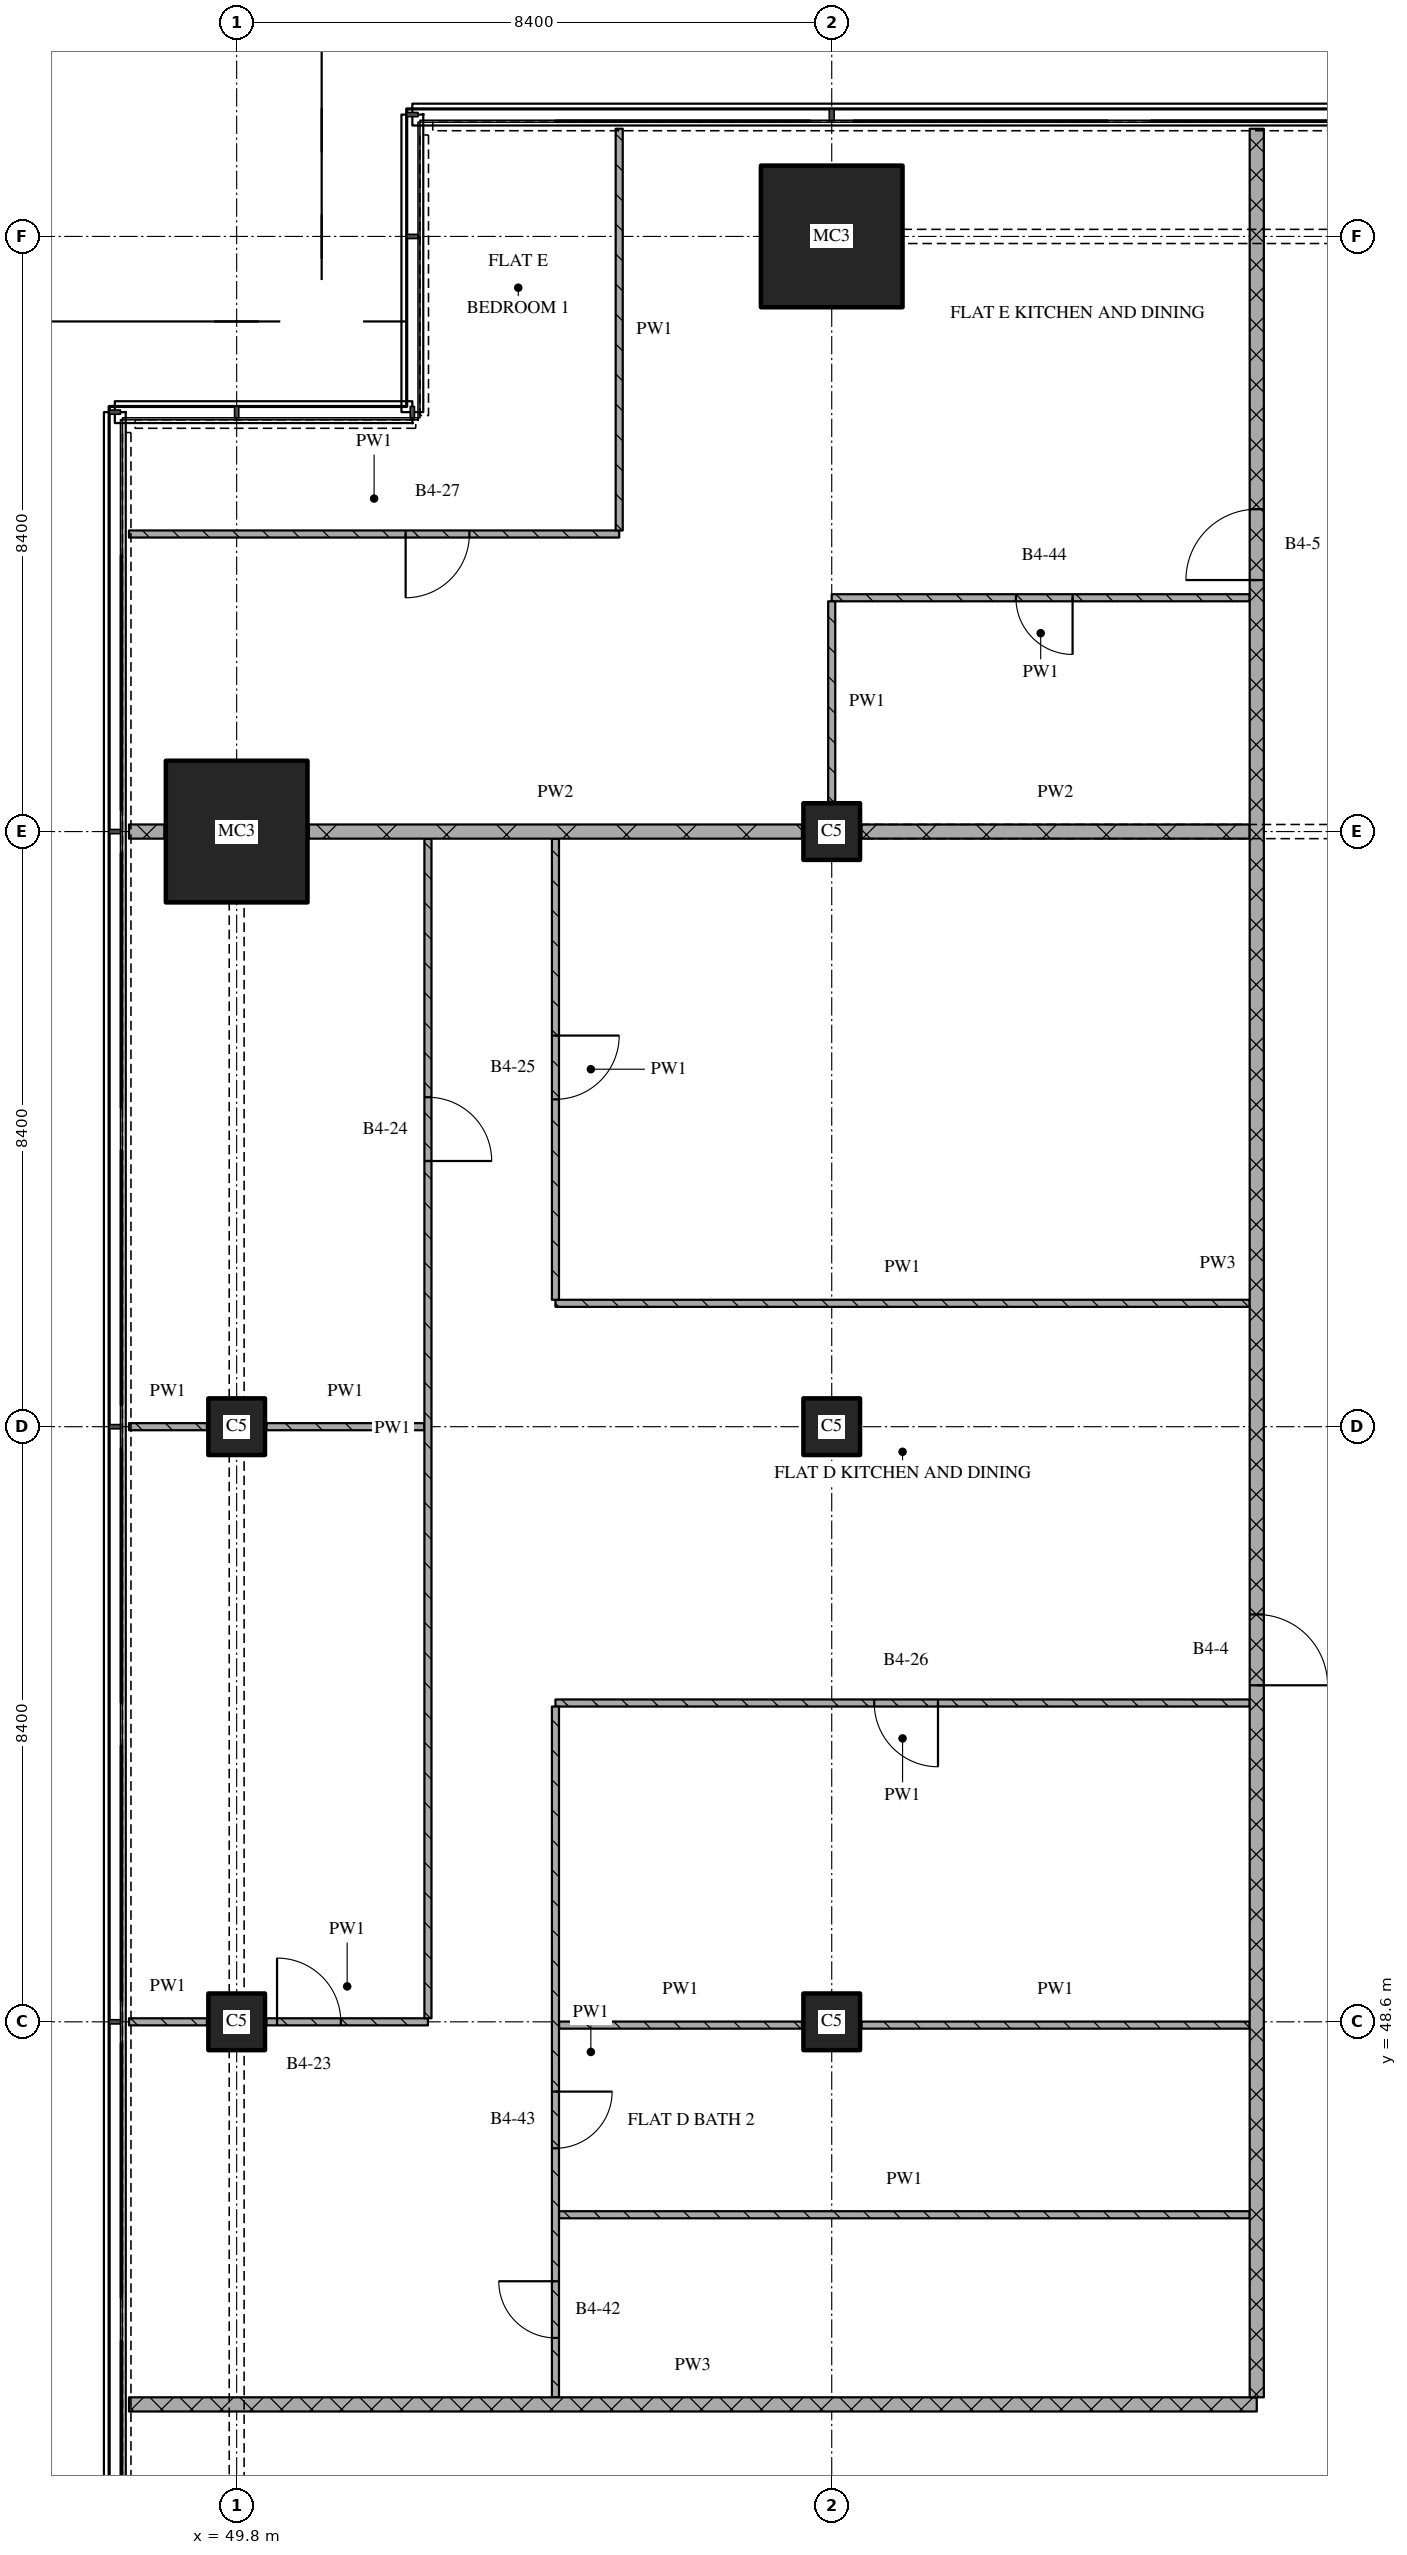
"""IFC4 building model, lengths in metres.
Left out: names, types, materials, properties, quantities, classifications, styles, units other than length and angle.
Written with IfcOpenShell. Run it as: python <this file> out.ifc"""

import sys

from ifc_helpers import new_model, si_unit, direction, frame, frame_2d, origin, origin_2d, place, context, subcontext, project, spatial, rectangle, extrude, element, fill, save


model = new_model("IFC4")
c1 = context("Model", 3, precision=1e-05, world=origin(), true_north=direction((0.0, 1.0)))
c2 = subcontext(c1, "Body", "Model", "MODEL_VIEW")
j1 = project(units=[si_unit("LENGTHUNIT", "METRE"), si_unit("PLANEANGLEUNIT", "RADIAN")], contexts=[c1])
p1 = place(None, origin())
s1 = spatial("IfcSite", under=j1, at=p1, CompositionType="ELEMENT")
p2 = place(p1, origin())
s2 = spatial("IfcBuilding", under=s1, at=p2, CompositionType="ELEMENT")
p3 = place(p2, frame((0.0, 0.0, 127.65)))
s3 = spatial("IfcBuildingStorey", under=s2, at=p3, CompositionType="ELEMENT", Elevation=127.65)
for number, where, z_axis, x_axis in (
    (1, (49.8, 48.6, 0.0), (0.0, 0.0, 1.0), (1.0, 0.0, 0.0)),
    (2, (49.8, 57.0, 0.0), (0.0, 0.0, 1.0), (1.0, 0.0, 0.0)),
):
    element("IfcColumn", number, at=place(p3, frame(where, z_axis=z_axis, x_axis=x_axis)), inside=s3, PredefinedType="COLUMN", context=c2, shape_type="SweptSolid", body=[
        extrude(rectangle(XDim=0.8, YDim=0.8, at=origin_2d()), origin(), (0.0, 0.0, 1.0), 3.6),
    ])
p4 = place(p3, frame((49.8, 65.4, 0.0), z_axis=(0.0, 0.0, 1.0), x_axis=(1.0, 0.0, 0.0)))
e3 = element("IfcColumn", 3, at=p4, inside=s3, PredefinedType="COLUMN", context=c2, shape_type="SweptSolid", body=[
    extrude(rectangle(XDim=2.0, YDim=2.0, at=origin_2d()), origin(), (0.0, 0.0, 1.0), 3.6),
])
for number, where, z_axis, x_axis in (
    (4, (58.2, 48.6, 0.0), (0.0, 0.0, 1.0), (1.0, 0.0, 0.0)),
    (5, (58.2, 57.0, 0.0), (0.0, 0.0, 1.0), (1.0, 0.0, 0.0)),
    (6, (58.2, 65.4, 0.0), (0.0, 0.0, 1.0), (1.0, 0.0, 0.0)),
):
    element("IfcColumn", number, at=place(p3, frame(where, z_axis=z_axis, x_axis=x_axis)), inside=s3, PredefinedType="COLUMN", context=c2, shape_type="SweptSolid", body=[
        extrude(rectangle(XDim=0.8, YDim=0.8, at=origin_2d()), origin(), (0.0, 0.0, 1.0), 3.6),
    ])
p5 = place(p3, frame((58.2, 73.8, 0.0), z_axis=(0.0, 0.0, 1.0), x_axis=(1.0, 0.0, 0.0)))
e7 = element("IfcColumn", 7, at=p5, inside=s3, PredefinedType="COLUMN", context=c2, shape_type="SweptSolid", body=[
    extrude(rectangle(XDim=2.0, YDim=2.0, at=origin_2d()), origin(), (0.0, 0.0, 1.0), 3.6),
])
p6 = place(p3, frame((48.28, 43.2, 0.0), z_axis=(0.0, 0.0, 1.0), x_axis=(1.0, 0.0, 0.0)))
e8 = element("IfcWall", 8, at=p6, inside=s3, PredefinedType="PARTITIONING", context=c2, shape_type="SweptSolid", body=[
    extrude(rectangle(XDim=15.92, YDim=0.2, at=frame_2d((7.96, 0.0))), origin(), (0.0, 0.0, 1.0), 3.32),
])
p7 = place(p3, frame((54.35, 45.877, 0.0), z_axis=(0.0, 0.0, 1.0), x_axis=(1.0, 0.0, 0.0)))
e9 = element("IfcWall", 9, at=p7, inside=s3, PredefinedType="PARTITIONING", context=c2, shape_type="SweptSolid", body=[
    extrude(rectangle(XDim=9.75, YDim=0.1, at=frame_2d((4.875, 0.0))), origin(), (0.0, 0.0, 1.0), 3.32),
])
p8 = place(p3, frame((54.35, 48.553, 0.0), z_axis=(0.0, 0.0, 1.0), x_axis=(1.0, 0.0, 0.0)))
e10 = element("IfcWall", 10, at=p8, inside=s3, PredefinedType="PARTITIONING", context=c2, shape_type="SweptSolid", body=[
    extrude(rectangle(XDim=3.43, YDim=0.1, at=frame_2d((1.715, 0.0))), origin(), (0.0, 0.0, 1.0), 3.32),
])
p9 = place(p3, frame((58.62, 48.553, 0.0), z_axis=(0.0, 0.0, 1.0), x_axis=(1.0, 0.0, 0.0)))
e11 = element("IfcWall", 11, at=p9, inside=s3, PredefinedType="PARTITIONING", context=c2, shape_type="SweptSolid", body=[
    extrude(rectangle(XDim=5.48, YDim=0.1, at=frame_2d((2.74, 0.0))), origin(), (0.0, 0.0, 1.0), 3.32),
])
p10 = place(p3, frame((48.28, 48.6, 0.0), z_axis=(0.0, 0.0, 1.0), x_axis=(1.0, 0.0, 0.0)))
e12 = element("IfcWall", 12, at=p10, inside=s3, PredefinedType="PARTITIONING", context=c2, shape_type="SweptSolid", body=[
    extrude(rectangle(XDim=1.1, YDim=0.1, at=frame_2d((0.55, 0.0))), origin(), (0.0, 0.0, 1.0), 3.32),
])
p11 = place(p3, frame((50.22, 48.6, 0.0), z_axis=(0.0, 0.0, 1.0), x_axis=(1.0, 0.0, 0.0)))
e13 = element("IfcWall", 13, at=p11, inside=s3, PredefinedType="PARTITIONING", context=c2, shape_type="SweptSolid", body=[
    extrude(rectangle(XDim=2.28, YDim=0.1, at=frame_2d((1.14, 0.0))), origin(), (0.0, 0.0, 1.0), 3.32),
])
p12 = place(p11, frame((0.15, 0.0, 0.0)))
e14 = element("IfcOpeningElement", 14, at=p12, cuts=e13, PredefinedType="OPENING", context=c2, shape_type="SweptSolid", body=[
    extrude(rectangle(XDim=0.9, YDim=2.1, at=frame_2d((0.45, 1.05))), frame((0.0, 0.06, 0.0), z_axis=(0.0, -1.0, 0.0), x_axis=(1.0, 0.0, 0.0)), (0.0, 0.0, 1.0), 0.12),
])
p13 = place(p3, frame((64.1, 53.1, 0.0), z_axis=(0.0, 0.0, 1.0), x_axis=(-1.0, 0.0, 0.0)))
e15 = element("IfcWall", 15, at=p13, inside=s3, PredefinedType="PARTITIONING", context=c2, shape_type="SweptSolid", body=[
    extrude(rectangle(XDim=9.8, YDim=0.1, at=frame_2d((4.9, 0.0))), origin(), (0.0, 0.0, 1.0), 3.32),
])
p14 = place(p13, frame((4.4, 0.0, 0.0)))
e16 = element("IfcOpeningElement", 16, at=p14, cuts=e15, PredefinedType="OPENING", context=c2, shape_type="SweptSolid", body=[
    extrude(rectangle(XDim=0.9, YDim=2.1, at=frame_2d((0.45, 1.05))), frame((0.0, 0.06, 0.0), z_axis=(0.0, -1.0, 0.0), x_axis=(1.0, 0.0, 0.0)), (0.0, 0.0, 1.0), 0.12),
])
p15 = place(p3, frame((48.28, 57.0, 0.0), z_axis=(0.0, 0.0, 1.0), x_axis=(1.0, 0.0, 0.0)))
e17 = element("IfcWall", 17, at=p15, inside=s3, PredefinedType="PARTITIONING", context=c2, shape_type="SweptSolid", body=[
    extrude(rectangle(XDim=1.1, YDim=0.1, at=frame_2d((0.55, 0.0))), origin(), (0.0, 0.0, 1.0), 3.32),
])
p16 = place(p3, frame((50.22, 57.0, 0.0), z_axis=(0.0, 0.0, 1.0), x_axis=(1.0, 0.0, 0.0)))
e18 = element("IfcWall", 18, at=p16, inside=s3, PredefinedType="PARTITIONING", context=c2, shape_type="SweptSolid", body=[
    extrude(rectangle(XDim=2.23, YDim=0.1, at=frame_2d((1.115, 0.0))), origin(), (0.0, 0.0, 1.0), 3.32),
])
p17 = place(p3, frame((54.3, 58.741, 0.0), z_axis=(0.0, 0.0, 1.0), x_axis=(1.0, 0.0, 0.0)))
e19 = element("IfcWall", 19, at=p17, inside=s3, PredefinedType="PARTITIONING", context=c2, shape_type="SweptSolid", body=[
    extrude(rectangle(XDim=9.8, YDim=0.1, at=frame_2d((4.9, 0.0))), origin(), (0.0, 0.0, 1.0), 3.32),
])
p18 = place(p3, frame((48.28, 65.4, 0.0), z_axis=(0.0, 0.0, 1.0), x_axis=(1.0, 0.0, 0.0)))
e20 = element("IfcWall", 20, at=p18, inside=s3, PredefinedType="PARTITIONING", context=c2, shape_type="SweptSolid", body=[
    extrude(rectangle(XDim=0.5, YDim=0.2, at=frame_2d((0.25, 0.0))), origin(), (0.0, 0.0, 1.0), 3.32),
])
p19 = place(p3, frame((50.82, 65.4, 0.0), z_axis=(0.0, 0.0, 1.0), x_axis=(1.0, 0.0, 0.0)))
e21 = element("IfcWall", 21, at=p19, inside=s3, PredefinedType="PARTITIONING", context=c2, shape_type="SweptSolid", body=[
    extrude(rectangle(XDim=6.96, YDim=0.2, at=frame_2d((3.48, 0.0))), origin(), (0.0, 0.0, 1.0), 3.32),
])
p20 = place(p3, frame((58.62, 65.4, 0.0), z_axis=(0.0, 0.0, 1.0), x_axis=(1.0, 0.0, 0.0)))
e22 = element("IfcWall", 22, at=p20, inside=s3, PredefinedType="PARTITIONING", context=c2, shape_type="SweptSolid", body=[
    extrude(rectangle(XDim=5.48, YDim=0.2, at=frame_2d((2.74, 0.0))), origin(), (0.0, 0.0, 1.0), 2.82),
])
p21 = place(p3, frame((64.1, 68.7, 0.0), z_axis=(0.0, 0.0, 1.0), x_axis=(-1.0, 0.0, 0.0)))
e23 = element("IfcWall", 23, at=p21, inside=s3, PredefinedType="PARTITIONING", context=c2, shape_type="SweptSolid", body=[
    extrude(rectangle(XDim=5.9, YDim=0.1, at=frame_2d((2.95, 0.0))), origin(), (0.0, 0.0, 1.0), 3.32),
])
p22 = place(p21, frame((2.5, 0.0, 0.0)))
e24 = element("IfcOpeningElement", 24, at=p22, cuts=e23, PredefinedType="OPENING", context=c2, shape_type="SweptSolid", body=[
    extrude(rectangle(XDim=0.8, YDim=2.1, at=frame_2d((0.4, 1.05))), frame((0.0, 0.06, 0.0), z_axis=(0.0, -1.0, 0.0), x_axis=(1.0, 0.0, 0.0)), (0.0, 0.0, 1.0), 0.12),
])
p23 = place(p3, frame((48.28, 69.6, 0.0), z_axis=(0.0, 0.0, 1.0), x_axis=(1.0, 0.0, 0.0)))
e25 = element("IfcWall", 25, at=p23, inside=s3, PredefinedType="PARTITIONING", context=c2, shape_type="SweptSolid", body=[
    extrude(rectangle(XDim=6.92, YDim=0.1, at=frame_2d((3.46, 0.0))), origin(), (0.0, 0.0, 1.0), 3.32),
])
p24 = place(p23, frame((3.905, 0.0, 0.0)))
e26 = element("IfcOpeningElement", 26, at=p24, cuts=e25, PredefinedType="OPENING", context=c2, shape_type="SweptSolid", body=[
    extrude(rectangle(XDim=0.9, YDim=2.1, at=frame_2d((0.45, 1.05))), frame((0.0, 0.06, 0.0), z_axis=(0.0, -1.0, 0.0), x_axis=(1.0, 0.0, 0.0)), (0.0, 0.0, 1.0), 0.12),
])
p25 = place(p3, frame((52.5, 48.65, 0.0), z_axis=(0.0, 0.0, 1.0), x_axis=(0.0, 1.0, 0.0)))
e27 = element("IfcWall", 27, at=p25, inside=s3, PredefinedType="PARTITIONING", context=c2, shape_type="SweptSolid", body=[
    extrude(rectangle(XDim=16.65, YDim=0.1, at=frame_2d((8.325, 0.0))), origin(), (0.0, 0.0, 1.0), 3.32),
])
p26 = place(p25, frame((12.1, 0.0, 0.0)))
e28 = element("IfcOpeningElement", 28, at=p26, cuts=e27, PredefinedType="OPENING", context=c2, shape_type="SweptSolid", body=[
    extrude(rectangle(XDim=0.9, YDim=2.1, at=frame_2d((0.45, 1.05))), frame((0.0, 0.06, 0.0), z_axis=(0.0, -1.0, 0.0), x_axis=(1.0, 0.0, 0.0)), (0.0, 0.0, 1.0), 0.12),
])
p27 = place(p3, frame((54.3, 53.05, 0.0), z_axis=(0.0, 0.0, 1.0), x_axis=(0.0, -1.0, 0.0)))
e29 = element("IfcWall", 29, at=p27, inside=s3, PredefinedType="PARTITIONING", context=c2, shape_type="SweptSolid", body=[
    extrude(rectangle(XDim=9.75, YDim=0.1, at=frame_2d((4.875, 0.0))), origin(), (0.0, 0.0, 1.0), 3.32),
])
p28 = place(p27, frame((5.435, 0.0, 0.0)))
e30 = element("IfcOpeningElement", 30, at=p28, cuts=e29, PredefinedType="OPENING", context=c2, shape_type="SweptSolid", body=[
    extrude(rectangle(XDim=0.8, YDim=2.1, at=frame_2d((0.4, 1.05))), frame((0.0, 0.06, 0.0), z_axis=(0.0, -1.0, 0.0), x_axis=(1.0, 0.0, 0.0)), (0.0, 0.0, 1.0), 0.12),
])
p29 = place(p27, frame((8.112, 0.0, 0.0)))
e31 = element("IfcOpeningElement", 31, at=p29, cuts=e29, PredefinedType="OPENING", context=c2, shape_type="SweptSolid", body=[
    extrude(rectangle(XDim=0.8, YDim=2.1, at=frame_2d((0.4, 1.05))), frame((0.0, 0.06, 0.0), z_axis=(0.0, -1.0, 0.0), x_axis=(1.0, 0.0, 0.0)), (0.0, 0.0, 1.0), 0.12),
])
p30 = place(p3, frame((54.3, 65.3, 0.0), z_axis=(0.0, 0.0, 1.0), x_axis=(0.0, -1.0, 0.0)))
e32 = element("IfcWall", 32, at=p30, inside=s3, PredefinedType="PARTITIONING", context=c2, shape_type="SweptSolid", body=[
    extrude(rectangle(XDim=6.509, YDim=0.1, at=frame_2d((3.254, 0.0))), origin(), (0.0, 0.0, 1.0), 3.32),
])
p31 = place(p30, frame((2.779, 0.0, 0.0)))
e33 = element("IfcOpeningElement", 33, at=p31, cuts=e32, PredefinedType="OPENING", context=c2, shape_type="SweptSolid", body=[
    extrude(rectangle(XDim=0.9, YDim=2.1, at=frame_2d((0.45, 1.05))), frame((0.0, 0.06, 0.0), z_axis=(0.0, -1.0, 0.0), x_axis=(1.0, 0.0, 0.0)), (0.0, 0.0, 1.0), 0.12),
])
p32 = place(p3, frame((55.2, 75.32, 0.0), z_axis=(0.0, 0.0, 1.0), x_axis=(0.0, -1.0, 0.0)))
e34 = element("IfcWall", 34, at=p32, inside=s3, PredefinedType="PARTITIONING", context=c2, shape_type="SweptSolid", body=[
    extrude(rectangle(XDim=5.67, YDim=0.1, at=frame_2d((2.835, 0.0))), origin(), (0.0, 0.0, 1.0), 3.32),
])
p33 = place(p3, frame((58.2, 68.65, 0.0), z_axis=(0.0, 0.0, 1.0), x_axis=(0.0, -1.0, 0.0)))
e35 = element("IfcWall", 35, at=p33, inside=s3, PredefinedType="PARTITIONING", context=c2, shape_type="SweptSolid", body=[
    extrude(rectangle(XDim=2.83, YDim=0.1, at=frame_2d((1.415, 0.0))), origin(), (0.0, 0.0, 1.0), 3.32),
])
p34 = place(p3, frame((64.2, 43.3, 0.0), z_axis=(0.0, 0.0, 1.0), x_axis=(0.0, 1.0, 0.0)))
e36 = element("IfcWall", 36, at=p34, inside=s3, PredefinedType="PARTITIONING", context=c2, shape_type="SweptSolid", body=[
    extrude(rectangle(XDim=32.02, YDim=0.2, at=frame_2d((16.01, 0.0))), origin(), (0.0, 0.0, 1.0), 3.32),
])
p35 = place(p34, frame((10.05, 0.0, 0.0)))
e37 = element("IfcOpeningElement", 37, at=p35, cuts=e36, PredefinedType="OPENING", context=c2, shape_type="SweptSolid", body=[
    extrude(rectangle(XDim=1.0, YDim=2.1, at=frame_2d((0.5, 1.05))), frame((0.0, 0.11, 0.0), z_axis=(0.0, -1.0, 0.0), x_axis=(1.0, 0.0, 0.0)), (0.0, 0.0, 1.0), 0.22),
])
p36 = place(p34, frame((25.65, 0.0, 0.0)))
e38 = element("IfcOpeningElement", 38, at=p36, cuts=e36, PredefinedType="OPENING", context=c2, shape_type="SweptSolid", body=[
    extrude(rectangle(XDim=1.0, YDim=2.1, at=frame_2d((0.5, 1.05))), frame((0.0, 0.11, 0.0), z_axis=(0.0, -1.0, 0.0), x_axis=(1.0, 0.0, 0.0)), (0.0, 0.0, 1.0), 0.22),
])
p37 = place(p12, origin())
e39 = element("IfcDoor", 39, at=p37, inside=s3, OperationType="SINGLE_SWING_LEFT", PredefinedType="DOOR", context=c2, shape_type="SweptSolid", body=[
    extrude(rectangle(XDim=0.9, YDim=2.1, at=frame_2d((0.45, 1.05))), frame((0.0, 0.025, 0.0), z_axis=(0.0, -1.0, 0.0), x_axis=(1.0, 0.0, 0.0)), (0.0, 0.0, 1.0), 0.05),
])
fill(e14, e39)
p38 = place(p14, origin())
e40 = element("IfcDoor", 40, at=p38, inside=s3, OperationType="SINGLE_SWING_LEFT", PredefinedType="DOOR", context=c2, shape_type="SweptSolid", body=[
    extrude(rectangle(XDim=0.9, YDim=2.1, at=frame_2d((0.45, 1.05))), frame((0.0, 0.025, 0.0), z_axis=(0.0, -1.0, 0.0), x_axis=(1.0, 0.0, 0.0)), (0.0, 0.0, 1.0), 0.05),
])
fill(e16, e40)
p39 = place(p22, origin())
e41 = element("IfcDoor", 41, at=p39, inside=s3, OperationType="SINGLE_SWING_LEFT", PredefinedType="DOOR", context=c2, shape_type="SweptSolid", body=[
    extrude(rectangle(XDim=0.8, YDim=2.1, at=frame_2d((0.4, 1.05))), frame((0.0, 0.025, 0.0), z_axis=(0.0, -1.0, 0.0), x_axis=(1.0, 0.0, 0.0)), (0.0, 0.0, 1.0), 0.05),
])
fill(e24, e41)
p40 = place(p24, origin())
e42 = element("IfcDoor", 42, at=p40, inside=s3, OperationType="SINGLE_SWING_RIGHT", PredefinedType="DOOR", context=c2, shape_type="SweptSolid", body=[
    extrude(rectangle(XDim=0.9, YDim=2.1, at=frame_2d((0.45, 1.05))), frame((0.0, 0.025, 0.0), z_axis=(0.0, -1.0, 0.0), x_axis=(1.0, 0.0, 0.0)), (0.0, 0.0, 1.0), 0.05),
])
fill(e26, e42)
p41 = place(p26, origin())
e43 = element("IfcDoor", 43, at=p41, inside=s3, OperationType="SINGLE_SWING_RIGHT", PredefinedType="DOOR", context=c2, shape_type="SweptSolid", body=[
    extrude(rectangle(XDim=0.9, YDim=2.1, at=frame_2d((0.45, 1.05))), frame((0.0, 0.025, 0.0), z_axis=(0.0, -1.0, 0.0), x_axis=(1.0, 0.0, 0.0)), (0.0, 0.0, 1.0), 0.05),
])
fill(e28, e43)
p42 = place(p28, origin())
e44 = element("IfcDoor", 44, at=p42, inside=s3, OperationType="SINGLE_SWING_LEFT", PredefinedType="DOOR", context=c2, shape_type="SweptSolid", body=[
    extrude(rectangle(XDim=0.8, YDim=2.1, at=frame_2d((0.4, 1.05))), frame((0.0, 0.025, 0.0), z_axis=(0.0, -1.0, 0.0), x_axis=(1.0, 0.0, 0.0)), (0.0, 0.0, 1.0), 0.05),
])
fill(e30, e44)
p43 = place(p29, origin())
e45 = element("IfcDoor", 45, at=p43, inside=s3, OperationType="SINGLE_SWING_RIGHT", PredefinedType="DOOR", context=c2, shape_type="SweptSolid", body=[
    extrude(rectangle(XDim=0.8, YDim=2.1, at=frame_2d((0.4, 1.05))), frame((0.0, 0.025, 0.0), z_axis=(0.0, -1.0, 0.0), x_axis=(1.0, 0.0, 0.0)), (0.0, 0.0, 1.0), 0.05),
])
fill(e31, e45)
p44 = place(p31, origin())
e46 = element("IfcDoor", 46, at=p44, inside=s3, OperationType="SINGLE_SWING_LEFT", PredefinedType="DOOR", context=c2, shape_type="SweptSolid", body=[
    extrude(rectangle(XDim=0.9, YDim=2.1, at=frame_2d((0.45, 1.05))), frame((0.0, 0.025, 0.0), z_axis=(0.0, -1.0, 0.0), x_axis=(1.0, 0.0, 0.0)), (0.0, 0.0, 1.0), 0.05),
])
fill(e33, e46)
p45 = place(p35, origin())
e47 = element("IfcDoor", 47, at=p45, inside=s3, OperationType="SINGLE_SWING_RIGHT", PredefinedType="DOOR", context=c2, shape_type="SweptSolid", body=[
    extrude(rectangle(XDim=1.0, YDim=2.1, at=frame_2d((0.5, 1.05))), frame((0.0, 0.025, 0.0), z_axis=(0.0, -1.0, 0.0), x_axis=(1.0, 0.0, 0.0)), (0.0, 0.0, 1.0), 0.05),
])
fill(e37, e47)
p46 = place(p36, origin())
e48 = element("IfcDoor", 48, at=p46, inside=s3, OperationType="SINGLE_SWING_LEFT", PredefinedType="DOOR", context=c2, shape_type="SweptSolid", body=[
    extrude(rectangle(XDim=1.0, YDim=2.1, at=frame_2d((0.5, 1.05))), frame((0.0, 0.025, 0.0), z_axis=(0.0, -1.0, 0.0), x_axis=(1.0, 0.0, 0.0)), (0.0, 0.0, 1.0), 0.05),
])
fill(e38, e48)
save(model, sys.argv[1])
